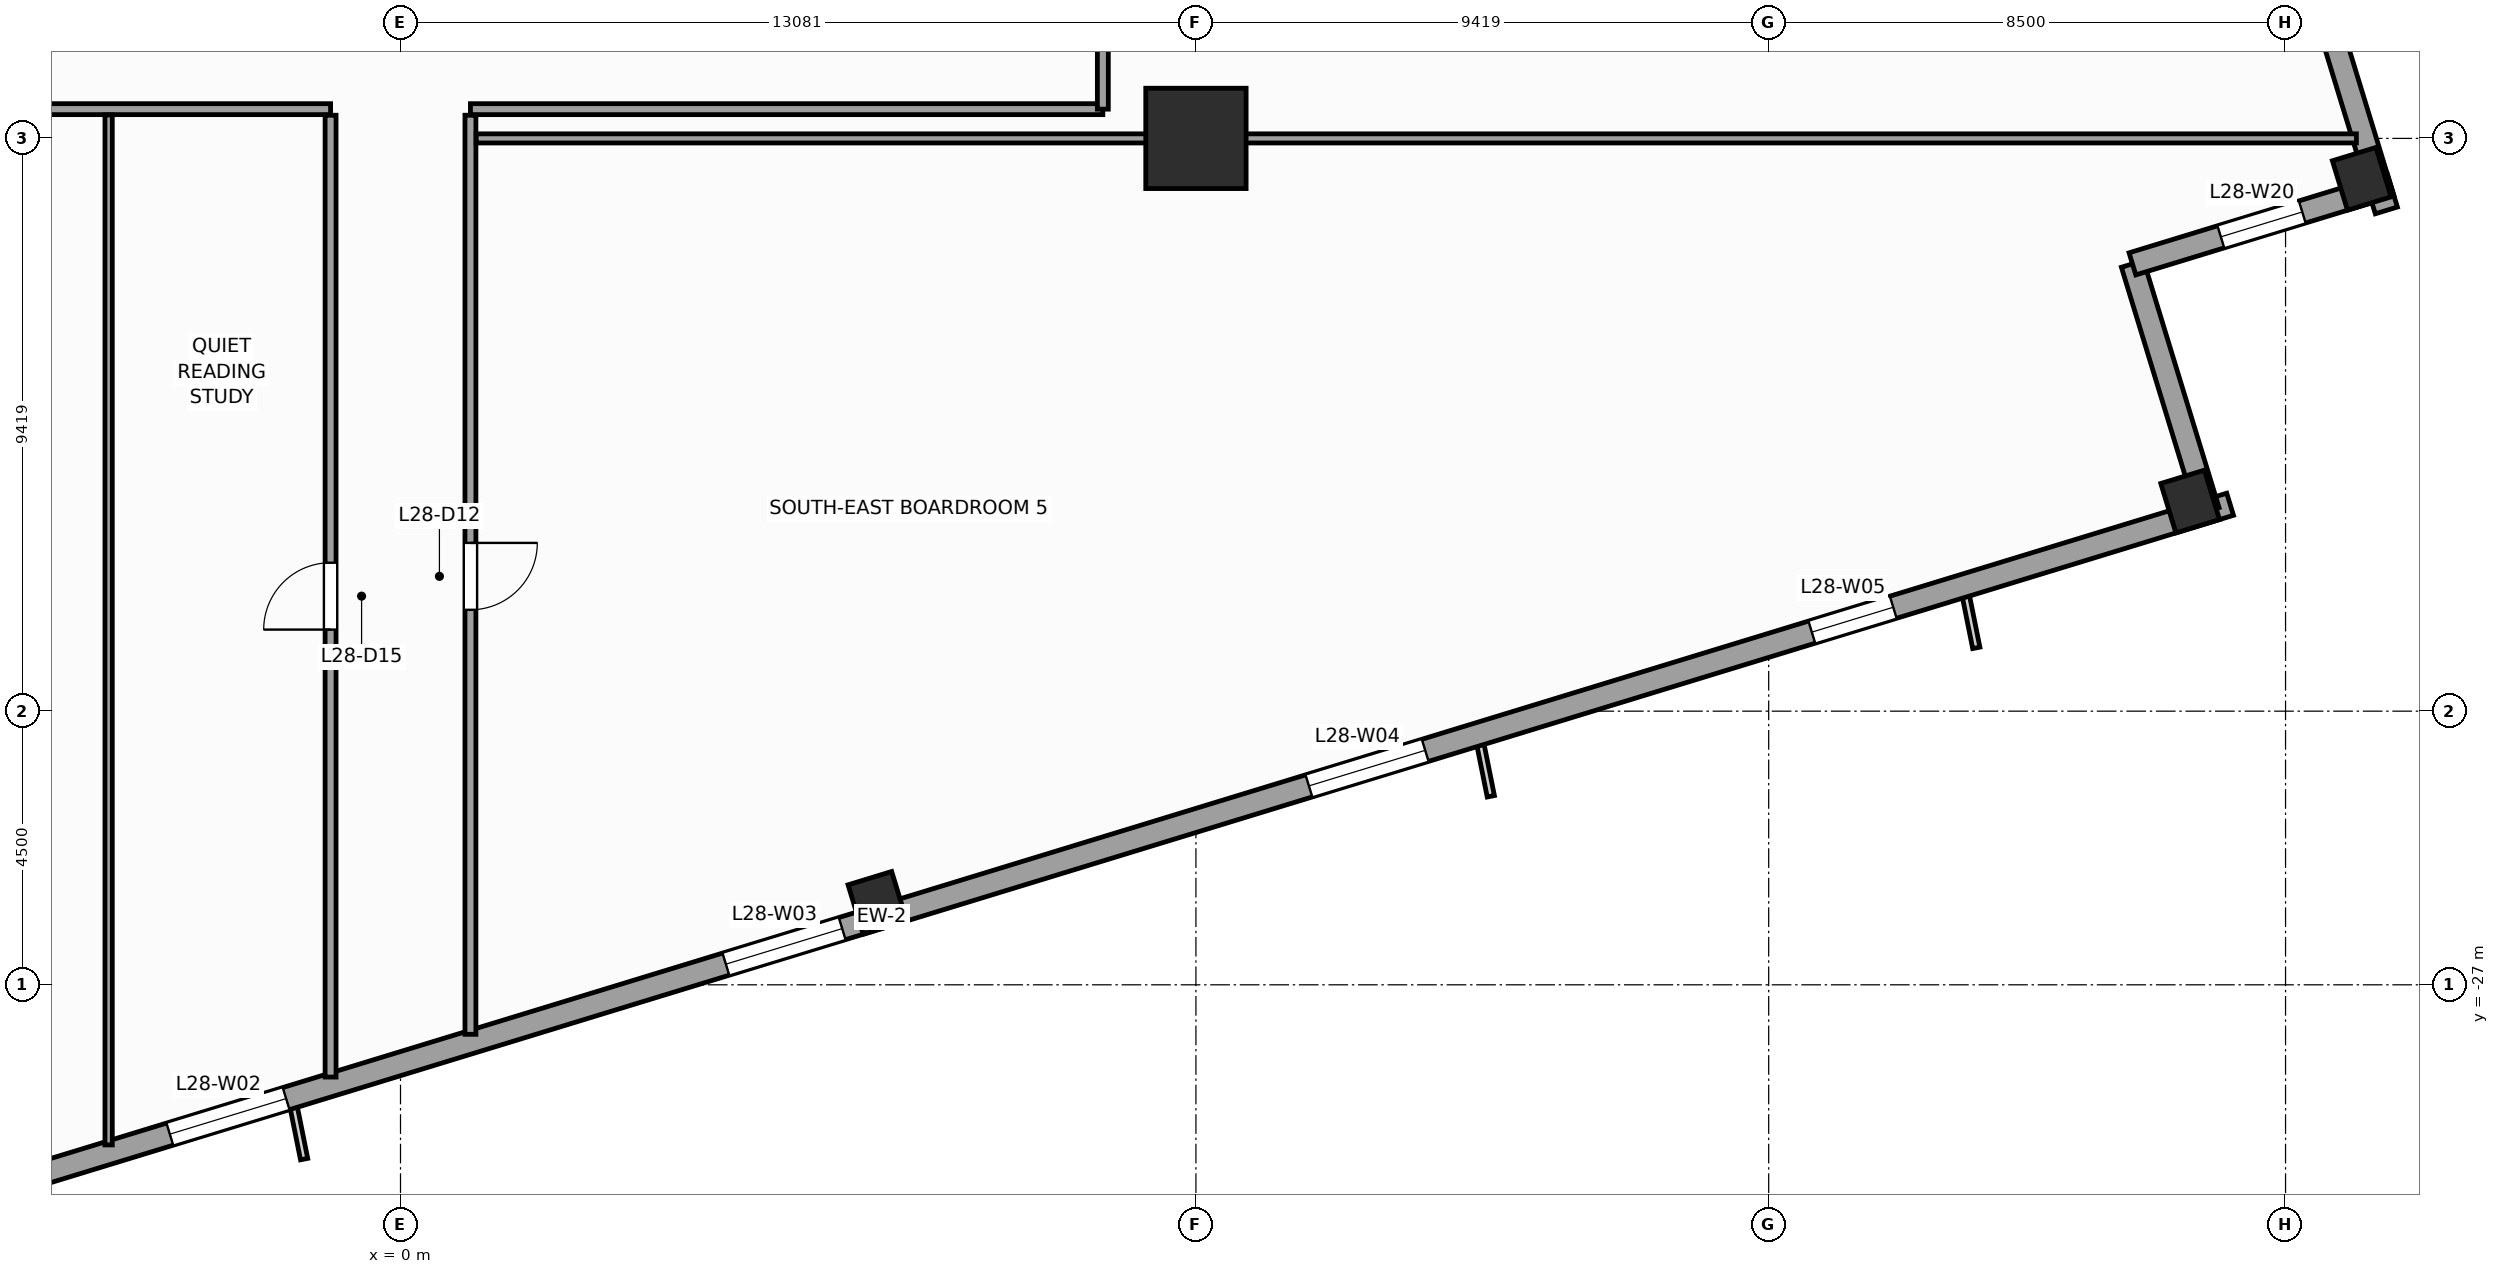
"""IFC4 building model, lengths in metres.
Left out: names, types, materials, properties, quantities, classifications, styles, units other than length and angle.
Written with IfcOpenShell. Run it as: python <this file> out.ifc"""

import sys

from ifc_helpers import new_model, si_unit, direction, frame, frame_2d, origin, origin_2d, place, context, subcontext, project, spatial, rectangle, extrude, source, transform, mapped, element, fill, save


model = new_model("IFC4")
c1 = context("Model", 3, precision=1e-05, world=origin(), true_north=direction((0.0, 1.0)))
c2 = subcontext(c1, "Body", "Model", "MODEL_VIEW")
j1 = project(units=[si_unit("LENGTHUNIT", "METRE"), si_unit("PLANEANGLEUNIT", "RADIAN")], contexts=[c1])
p1 = place(None, origin())
s1 = spatial("IfcSite", under=j1, at=p1, CompositionType="ELEMENT")
p2 = place(p1, origin())
s2 = spatial("IfcBuilding", under=s1, at=p2, CompositionType="ELEMENT")
p3 = place(p2, frame((0.0, 0.0, 119.2)))
s3 = spatial("IfcBuildingStorey", under=s2, at=p3, CompositionType="ELEMENT", Elevation=119.2)
m1 = source(origin(), c2, "Body", "SweptSolid", [
    extrude(rectangle(XDim=1.65, YDim=1.65, at=origin_2d()), origin(), (0.0, 0.0, 1.0), 4.0),
])
p4 = place(p3, frame((13.081, -13.081, 0.0), z_axis=(0.0, 0.0, 1.0), x_axis=(1.0, 0.0, 0.0)))
e1 = element("IfcColumn", 1, at=p4, inside=s3, PredefinedType="COLUMN", context=c2, shape_type="MappedRepresentation", body=[
    mapped(m1, transform((0.0, 0.0, 0.0), scale=1.0)),
])
m2 = source(origin(), c2, "Body", "SweptSolid", [
    extrude(rectangle(XDim=0.75, YDim=0.85, at=origin_2d()), origin(), (0.0, 0.0, 1.0), 4.0),
])
for number, where, z_axis, x_axis in (
    (2, (7.843, -25.653, 0.0), (0.0, 0.0, 1.0), (0.956, 0.292, 0.0)),
    (3, (29.431, -19.052, 0.0), (0.0, 0.0, 1.0), (0.956, 0.292, 0.0)),
    (4, (32.253, -13.746, 0.0), (0.0, 0.0, 1.0), (0.956, 0.292, 0.0)),
):
    element("IfcColumn", number, at=place(p3, frame(where, z_axis=z_axis, x_axis=x_axis)), inside=s3, PredefinedType="COLUMN", context=c2, shape_type="MappedRepresentation", body=[
        mapped(m2, transform((0.0, 0.0, 0.0), scale=1.0)),
    ])
p5 = place(p3, frame((-14.265, -32.658, 0.0), z_axis=(0.0, 0.0, 1.0), x_axis=(0.956304320851, 0.292373127906, 0.0)))
e5 = element("IfcWall", 5, at=p5, inside=s3, PredefinedType="STANDARD", context=c2, shape_type="SweptSolid", body=[
    extrude(rectangle(XDim=46.38, YDim=0.38, at=frame_2d((23.19, 0.0))), origin(), (0.0, 0.0, 1.0), 3.14),
])
p6 = place(p5, frame((4.865, 0.0, 0.51)))
e6 = element("IfcOpeningElement", 6, at=p6, cuts=e5, PredefinedType="OPENING", context=c2, shape_type="SweptSolid", body=[
    extrude(rectangle(XDim=1.4, YDim=2.4, at=frame_2d((0.7, 1.2))), frame((0.0, 0.2, 0.0), z_axis=(0.0, -1.0, 0.0), x_axis=(1.0, 0.0, 0.0)), (0.0, 0.0, 1.0), 0.4),
])
p7 = place(p5, frame((10.95, 0.0, 0.51)))
e7 = element("IfcOpeningElement", 7, at=p7, cuts=e5, PredefinedType="OPENING", context=c2, shape_type="SweptSolid", body=[
    extrude(rectangle(XDim=2.0, YDim=2.4, at=frame_2d((1.0, 1.2))), frame((0.0, 0.2, 0.0), z_axis=(0.0, -1.0, 0.0), x_axis=(1.0, 0.0, 0.0)), (0.0, 0.0, 1.0), 0.4),
])
p8 = place(p5, frame((20.512, 0.0, 0.51)))
e8 = element("IfcOpeningElement", 8, at=p8, cuts=e5, PredefinedType="OPENING", context=c2, shape_type="SweptSolid", body=[
    extrude(rectangle(XDim=2.0, YDim=2.4, at=frame_2d((1.0, 1.2))), frame((0.0, 0.2, 0.0), z_axis=(0.0, -1.0, 0.0), x_axis=(1.0, 0.0, 0.0)), (0.0, 0.0, 1.0), 0.4),
])
p9 = place(p5, frame((30.538, 0.0, 0.51)))
e9 = element("IfcOpeningElement", 9, at=p9, cuts=e5, PredefinedType="OPENING", context=c2, shape_type="SweptSolid", body=[
    extrude(rectangle(XDim=2.0, YDim=2.4, at=frame_2d((1.0, 1.2))), frame((0.0, 0.2, 0.0), z_axis=(0.0, -1.0, 0.0), x_axis=(1.0, 0.0, 0.0)), (0.0, 0.0, 1.0), 0.4),
])
p10 = place(p5, frame((39.187, 0.0, 0.51)))
e10 = element("IfcOpeningElement", 10, at=p10, cuts=e5, PredefinedType="OPENING", context=c2, shape_type="SweptSolid", body=[
    extrude(rectangle(XDim=1.4, YDim=2.4, at=frame_2d((0.7, 1.2))), frame((0.0, 0.2, 0.0), z_axis=(0.0, -1.0, 0.0), x_axis=(1.0, 0.0, 0.0)), (0.0, 0.0, 1.0), 0.4),
])
p11 = place(p3, frame((29.725, -19.208, 0.0), z_axis=(0.0, 0.0, 1.0), x_axis=(-0.292345507338, 0.956312764915, 0.0)))
e11 = element("IfcWall", 11, at=p11, inside=s3, PredefinedType="STANDARD", context=c2, shape_type="SweptSolid", body=[
    extrude(rectangle(XDim=4.25, YDim=0.38, at=frame_2d((2.125, 0.0))), origin(), (0.0, 0.0, 1.0), 3.74),
])
p12 = place(p3, frame((28.482, -15.144, 0.0), z_axis=(0.0, 0.0, 1.0), x_axis=(0.956304176051, 0.292373601522, 0.0)))
e12 = element("IfcWall", 12, at=p12, inside=s3, PredefinedType="STANDARD", context=c2, shape_type="SweptSolid", body=[
    extrude(rectangle(XDim=4.44, YDim=0.38, at=frame_2d((2.22, 0.0))), origin(), (0.0, 0.0, 1.0), 3.04),
])
p13 = place(p12, frame((1.52, 0.0, 0.51)))
e13 = element("IfcOpeningElement", 13, at=p13, cuts=e12, PredefinedType="OPENING", context=c2, shape_type="SweptSolid", body=[
    extrude(rectangle(XDim=1.4, YDim=2.4, at=frame_2d((0.7, 1.2))), frame((0.0, 0.2, 0.0), z_axis=(0.0, -1.0, 0.0), x_axis=(1.0, 0.0, 0.0)), (0.0, 0.0, 1.0), 0.4),
])
p14 = place(p3, frame((32.658, -14.265, 0.0), z_axis=(0.0, 0.0, 1.0), x_axis=(-0.292373127906, 0.956304320851, 0.0)))
e14 = element("IfcWall", 14, at=p14, inside=s3, PredefinedType="STANDARD", context=c2, shape_type="SweptSolid", body=[
    extrude(rectangle(XDim=46.38, YDim=0.38, at=frame_2d((23.19, 0.0))), origin(), (0.0, 0.0, 1.0), 3.14),
])
p15 = place(p14, frame((28.265, 0.0, 0.0)))
e15 = element("IfcOpeningElement", 15, at=p15, cuts=e14, PredefinedType="OPENING", context=c2, shape_type="SweptSolid", body=[
    extrude(rectangle(XDim=1.05, YDim=2.25, at=frame_2d((0.525, 1.125))), frame((0.0, 0.2, 0.0), z_axis=(0.0, -1.0, 0.0), x_axis=(1.0, 0.0, 0.0)), (0.0, 0.0, 1.0), 0.4),
])
p16 = place(p14, frame((4.865, 0.0, 0.51)))
e16 = element("IfcOpeningElement", 16, at=p16, cuts=e14, PredefinedType="OPENING", context=c2, shape_type="SweptSolid", body=[
    extrude(rectangle(XDim=1.4, YDim=2.4, at=frame_2d((0.7, 1.2))), frame((0.0, 0.2, 0.0), z_axis=(0.0, -1.0, 0.0), x_axis=(1.0, 0.0, 0.0)), (0.0, 0.0, 1.0), 0.4),
])
p17 = place(p14, frame((12.45, 0.0, 0.51)))
e17 = element("IfcOpeningElement", 17, at=p17, cuts=e14, PredefinedType="OPENING", context=c2, shape_type="SweptSolid", body=[
    extrude(rectangle(XDim=2.0, YDim=2.4, at=frame_2d((1.0, 1.2))), frame((0.0, 0.2, 0.0), z_axis=(0.0, -1.0, 0.0), x_axis=(1.0, 0.0, 0.0)), (0.0, 0.0, 1.0), 0.4),
])
p18 = place(p14, frame((30.538, 0.0, 0.51)))
e18 = element("IfcOpeningElement", 18, at=p18, cuts=e14, PredefinedType="OPENING", context=c2, shape_type="SweptSolid", body=[
    extrude(rectangle(XDim=2.0, YDim=2.4, at=frame_2d((1.0, 1.2))), frame((0.0, 0.2, 0.0), z_axis=(0.0, -1.0, 0.0), x_axis=(1.0, 0.0, 0.0)), (0.0, 0.0, 1.0), 0.4),
])
p19 = place(p14, frame((39.187, 0.0, 0.51)))
e19 = element("IfcOpeningElement", 19, at=p19, cuts=e14, PredefinedType="OPENING", context=c2, shape_type="SweptSolid", body=[
    extrude(rectangle(XDim=1.4, YDim=2.4, at=frame_2d((0.7, 1.2))), frame((0.0, 0.2, 0.0), z_axis=(0.0, -1.0, 0.0), x_axis=(1.0, 0.0, 0.0)), (0.0, 0.0, 1.0), 0.4),
])
p20 = place(p3, frame((-10.45, -12.6, 0.0), z_axis=(0.0, 0.0, 1.0), x_axis=(1.0, 0.0, 0.0)))
e20 = element("IfcWall", 20, at=p20, inside=s3, PredefinedType="PARTITIONING", context=c2, shape_type="SweptSolid", body=[
    extrude(rectangle(XDim=9.3, YDim=0.18, at=frame_2d((4.65, 0.0))), origin(), (0.0, 0.0, 1.0), 3.74),
])
p21 = place(p3, frame((1.15, -12.6, 0.0), z_axis=(0.0, 0.0, 1.0), x_axis=(1.0, 0.0, 0.0)))
e21 = element("IfcWall", 21, at=p21, inside=s3, PredefinedType="PARTITIONING", context=c2, shape_type="SweptSolid", body=[
    extrude(rectangle(XDim=10.4, YDim=0.18, at=frame_2d((5.2, 0.0))), origin(), (0.0, 0.0, 1.0), 3.74),
])
p22 = place(p3, frame((11.55, -12.6, 0.0), z_axis=(0.0, 0.0, 1.0), x_axis=(0.0, 1.0, 0.0)))
e22 = element("IfcWall", 22, at=p22, inside=s3, PredefinedType="PARTITIONING", context=c2, shape_type="SweptSolid", body=[
    extrude(rectangle(XDim=13.65, YDim=0.18, at=frame_2d((6.825, 0.0))), origin(), (0.0, 0.0, 1.0), 3.74),
])
p23 = place(p22, frame((2.714, 0.0, 0.0)))
e23 = element("IfcOpeningElement", 23, at=p23, cuts=e22, PredefinedType="OPENING", context=c2, shape_type="SweptSolid", body=[
    extrude(rectangle(XDim=1.1, YDim=2.2, at=frame_2d((0.55, 1.1))), frame((0.0, 0.1, 0.0), z_axis=(0.0, -1.0, 0.0), x_axis=(1.0, 0.0, 0.0)), (0.0, 0.0, 1.0), 0.2),
])
p24 = place(p3, frame((-1.15, -28.517, 0.0), z_axis=(0.0, 0.0, 1.0), x_axis=(0.0, 1.0, 0.0)))
e24 = element("IfcWall", 24, at=p24, inside=s3, PredefinedType="PARTITIONING", context=c2, shape_type="SweptSolid", body=[
    extrude(rectangle(XDim=15.817, YDim=0.18, at=frame_2d((7.909, 0.0))), origin(), (0.0, 0.0, 1.0), 3.74),
])
p25 = place(p24, frame((7.359, 0.0, 0.0)))
e25 = element("IfcOpeningElement", 25, at=p25, cuts=e24, PredefinedType="OPENING", context=c2, shape_type="SweptSolid", body=[
    extrude(rectangle(XDim=1.1, YDim=2.2, at=frame_2d((0.55, 1.1))), frame((0.0, 0.1, 0.0), z_axis=(0.0, -1.0, 0.0), x_axis=(1.0, 0.0, 0.0)), (0.0, 0.0, 1.0), 0.2),
])
p26 = place(p3, frame((1.15, -27.814, 0.0), z_axis=(0.0, 0.0, 1.0), x_axis=(0.0, 1.0, 0.0)))
e26 = element("IfcWall", 26, at=p26, inside=s3, PredefinedType="PARTITIONING", context=c2, shape_type="SweptSolid", body=[
    extrude(rectangle(XDim=15.114, YDim=0.18, at=frame_2d((7.557, 0.0))), origin(), (0.0, 0.0, 1.0), 3.74),
])
p27 = place(p26, frame((6.981, 0.0, 0.0)))
e27 = element("IfcOpeningElement", 27, at=p27, cuts=e26, PredefinedType="OPENING", context=c2, shape_type="SweptSolid", body=[
    extrude(rectangle(XDim=1.1, YDim=2.2, at=frame_2d((0.55, 1.1))), frame((0.0, 0.1, 0.0), z_axis=(0.0, -1.0, 0.0), x_axis=(1.0, 0.0, 0.0)), (0.0, 0.0, 1.0), 0.2),
])
p28 = place(p3, frame((1.245, -13.081, 0.0), z_axis=(0.0, 0.0, 1.0), x_axis=(1.0, 0.0, 0.0)))
e28 = element("IfcWall", 28, at=p28, inside=s3, PredefinedType="PARTITIONING", context=c2, shape_type="SweptSolid", body=[
    extrude(rectangle(XDim=30.92, YDim=0.15, at=frame_2d((15.46, 0.0))), origin(), (0.0, 0.0, 1.0), 2.732),
])
p29 = place(p3, frame((-4.8, -29.633, 0.0), z_axis=(0.0, 0.0, 1.0), x_axis=(0.0, 1.0, 0.0)))
e29 = element("IfcWall", 29, at=p29, inside=s3, PredefinedType="PARTITIONING", context=c2, shape_type="SweptSolid", body=[
    extrude(rectangle(XDim=16.938, YDim=0.12, at=frame_2d((8.469, 0.0))), origin(), (0.0, 0.0, 1.0), 3.74),
])
m3 = source(origin(), c2, "Body", "SweptSolid", [
    extrude(rectangle(XDim=2.0, YDim=2.4, at=frame_2d((1.0, 1.2))), frame((0.0, 0.03, 0.0), z_axis=(0.0, -1.0, 0.0), x_axis=(1.0, 0.0, 0.0)), (0.0, 0.0, 1.0), 0.06),
])
p30 = place(p7, origin())
e30 = element("IfcWindow", 30, at=p30, inside=s3, PartitioningType="SINGLE_PANEL", PredefinedType="WINDOW", context=c2, shape_type="MappedRepresentation", body=[
    mapped(m3, transform((0.0, 0.0, 0.0), scale=1.0)),
])
fill(e7, e30)
p31 = place(p8, origin())
e31 = element("IfcWindow", 31, at=p31, inside=s3, PartitioningType="SINGLE_PANEL", PredefinedType="WINDOW", context=c2, shape_type="MappedRepresentation", body=[
    mapped(m3, transform((0.0, 0.0, 0.0), scale=1.0)),
])
fill(e8, e31)
p32 = place(p9, origin())
e32 = element("IfcWindow", 32, at=p32, inside=s3, PartitioningType="SINGLE_PANEL", PredefinedType="WINDOW", context=c2, shape_type="MappedRepresentation", body=[
    mapped(m3, transform((0.0, 0.0, 0.0), scale=1.0)),
])
fill(e9, e32)
m4 = source(origin(), c2, "Body", "SweptSolid", [
    extrude(rectangle(XDim=1.4, YDim=2.4, at=frame_2d((0.7, 1.2))), frame((0.0, 0.03, 0.0), z_axis=(0.0, -1.0, 0.0), x_axis=(1.0, 0.0, 0.0)), (0.0, 0.0, 1.0), 0.06),
])
p33 = place(p10, origin())
e33 = element("IfcWindow", 33, at=p33, inside=s3, PartitioningType="SINGLE_PANEL", PredefinedType="WINDOW", context=c2, shape_type="MappedRepresentation", body=[
    mapped(m4, transform((0.0, 0.0, 0.0), scale=1.0)),
])
fill(e10, e33)
p34 = place(p13, origin())
e34 = element("IfcWindow", 34, at=p34, inside=s3, PartitioningType="SINGLE_PANEL", PredefinedType="WINDOW", context=c2, shape_type="MappedRepresentation", body=[
    mapped(m4, transform((0.0, 0.0, 0.0), scale=1.0)),
])
fill(e13, e34)
m5 = source(origin(), c2, "Body", "SweptSolid", [
    extrude(rectangle(XDim=1.1, YDim=2.2, at=frame_2d((0.55, 1.1))), frame((0.0, 0.025, 0.0), z_axis=(0.0, -1.0, 0.0), x_axis=(1.0, 0.0, 0.0)), (0.0, 0.0, 1.0), 0.05),
])
p35 = place(p27, frame((1.1, 0.0, 0.0), z_axis=(0.0, 0.0, 1.0), x_axis=(-1.0, 0.0, 0.0)))
e35 = element("IfcDoor", 35, at=p35, inside=s3, OperationType="SINGLE_SWING_RIGHT", PredefinedType="DOOR", context=c2, shape_type="MappedRepresentation", body=[
    mapped(m5, transform((0.0, 0.0, 0.0), scale=1.0)),
])
fill(e27, e35)
p36 = place(p25, origin())
e36 = element("IfcDoor", 36, at=p36, inside=s3, OperationType="SINGLE_SWING_LEFT", PredefinedType="DOOR", context=c2, shape_type="MappedRepresentation", body=[
    mapped(m5, transform((0.0, 0.0, 0.0), scale=1.0)),
])
fill(e25, e36)
save(model, sys.argv[1])
